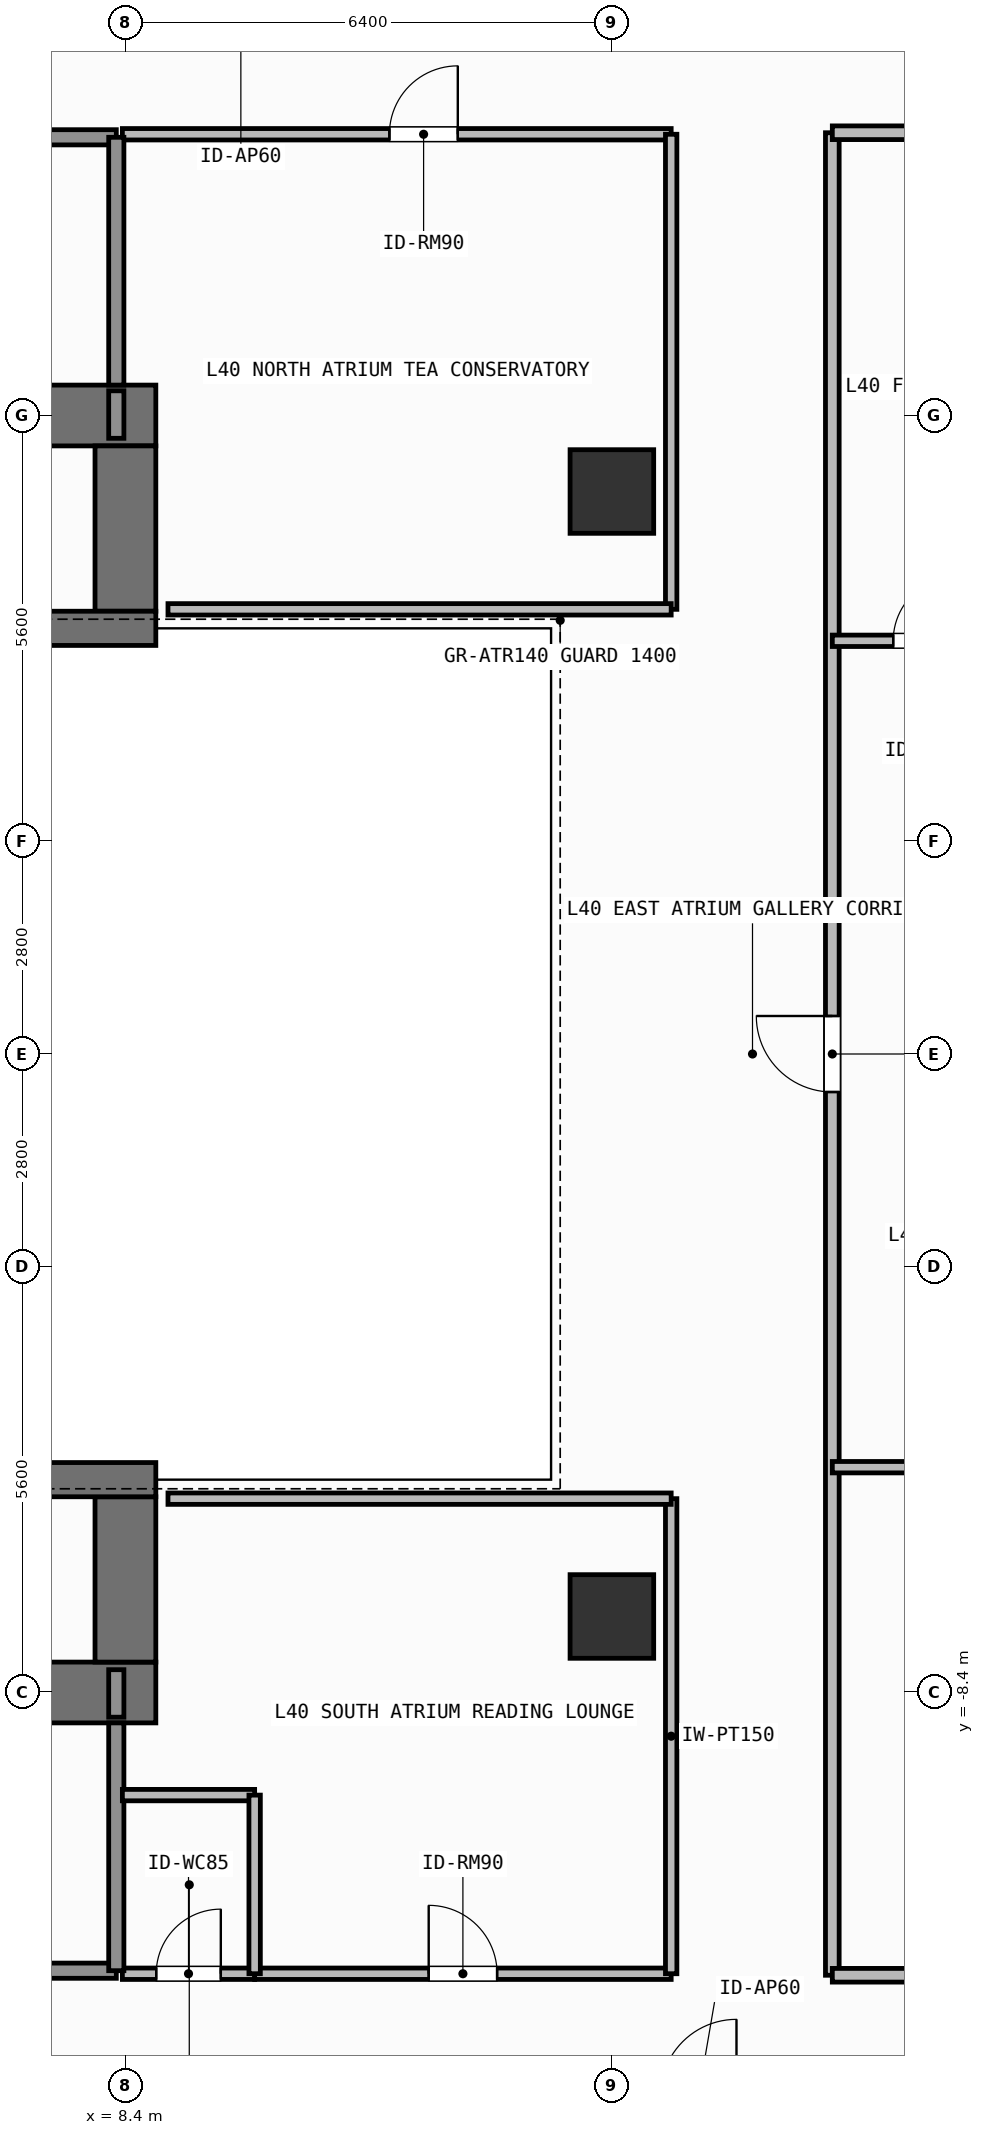
"""IFC4 building model, lengths in metres.
Left out: names, types, materials, properties, quantities, classifications, styles, units other than length and angle.
Written with IfcOpenShell. Run it as: python <this file> out.ifc"""

import sys

from ifc_helpers import new_model, si_unit, direction, frame, frame_2d, origin, origin_2d, place, context, subcontext, project, spatial, rectangle, extrude, element, fill, save


model = new_model("IFC4")
c1 = context("Model", 3, precision=1e-05, world=origin(), true_north=direction((0.0, 1.0)))
c2 = subcontext(c1, "Body", "Model", "MODEL_VIEW")
j1 = project(units=[si_unit("LENGTHUNIT", "METRE"), si_unit("PLANEANGLEUNIT", "RADIAN")], contexts=[c1])
p1 = place(None, origin())
s1 = spatial("IfcSite", under=j1, at=p1, CompositionType="ELEMENT")
p2 = place(p1, origin())
s2 = spatial("IfcBuilding", under=s1, at=p2, CompositionType="ELEMENT")
p3 = place(p2, frame((0.0, 0.0, 164.1)))
s3 = spatial("IfcBuildingStorey", under=s2, at=p3, CompositionType="ELEMENT", Elevation=164.1)
p4 = place(p3, frame((6.12, -8.4, 0.0), z_axis=(0.0, 0.0, 1.0), x_axis=(1.0, 0.0, 0.0)))
e1 = element("IfcWall", 1, at=p4, inside=s3, PredefinedType="SHEAR", context=c2, shape_type="SweptSolid", body=[
    extrude(rectangle(XDim=2.68, YDim=0.8, at=frame_2d((1.34, 0.0))), origin(), (0.0, 0.0, 1.0), 3.9),
])
p5 = place(p3, frame((-7.55, 8.4, 0.0), z_axis=(0.0, 0.0, 1.0), x_axis=(1.0, 0.0, 0.0)))
e2 = element("IfcWall", 2, at=p5, inside=s3, PredefinedType="SHEAR", context=c2, shape_type="SweptSolid", body=[
    extrude(rectangle(XDim=16.35, YDim=0.8, at=frame_2d((8.175, 0.0))), origin(), (0.0, 0.0, 1.0), 3.9),
])
for number, where, z_axis, x_axis in (
    (3, (8.4, -8.0, 0.0), (0.0, 0.0, 1.0), (0.0, 1.0, 0.0)),
    (4, (8.4, 5.825, 0.0), (0.0, 0.0, 1.0), (0.0, 1.0, 0.0)),
):
    element("IfcWall", number, at=place(p3, frame(where, z_axis=z_axis, x_axis=x_axis)), inside=s3, PredefinedType="SHEAR", context=c2, shape_type="SweptSolid", body=[
        extrude(rectangle(XDim=2.175, YDim=0.8, at=frame_2d((1.087, 0.0))), origin(), (0.0, 0.0, 1.0), 3.9),
    ])
for number, where, z_axis, x_axis in (
    (5, (3.045, -5.6, 0.0), (0.0, 0.0, 1.0), (1.0, 0.0, 0.0)),
    (6, (3.045, 5.6, 0.0), (0.0, 0.0, 1.0), (1.0, 0.0, 0.0)),
):
    element("IfcWall", number, at=place(p3, frame(where, z_axis=z_axis, x_axis=x_axis)), inside=s3, PredefinedType="SHEAR", context=c2, shape_type="SweptSolid", body=[
        extrude(rectangle(XDim=5.755, YDim=0.45, at=frame_2d((2.877, 0.0))), origin(), (0.0, 0.0, 1.0), 3.9),
    ])
for number, where, z_axis, x_axis in (
    (7, (14.8, -7.4, 0.0), (0.0, 0.0, 1.0), (1.0, 0.0, 0.0)),
    (8, (14.8, 7.4, 0.0), (0.0, 0.0, 1.0), (1.0, 0.0, 0.0)),
):
    element("IfcColumn", number, at=place(p3, frame(where, z_axis=z_axis, x_axis=x_axis)), inside=s3, PredefinedType="COLUMN", context=c2, shape_type="SweptSolid", body=[
        extrude(rectangle(XDim=1.1, YDim=1.1, at=origin_2d()), origin(), (0.0, 0.0, 1.0), 3.9),
    ])
p6 = place(p3, frame((4.58, -12.06, 0.0), z_axis=(0.0, 0.0, 1.0), x_axis=(1.0, 0.0, 0.0)))
e9 = element("IfcWall", 9, at=p6, inside=s3, PredefinedType="SOLIDWALL", context=c2, shape_type="SweptSolid", body=[
    extrude(rectangle(XDim=3.7, YDim=0.2, at=frame_2d((1.85, 0.0))), origin(), (0.0, 0.0, 1.0), 3.62),
])
p7 = place(p6, frame((1.212, 0.0, 0.0)))
e10 = element("IfcOpeningElement", 10, at=p7, cuts=e9, PredefinedType="OPENING", context=c2, shape_type="SweptSolid", body=[
    extrude(rectangle(XDim=1.1, YDim=2.15, at=frame_2d((0.55, 1.075))), frame((0.0, 0.11, 0.0), z_axis=(0.0, -1.0, 0.0), x_axis=(1.0, 0.0, 0.0)), (0.0, 0.0, 1.0), 0.22),
])
p8 = place(p3, frame((4.58, 12.06, 0.0), z_axis=(0.0, 0.0, 1.0), x_axis=(1.0, 0.0, 0.0)))
e11 = element("IfcWall", 11, at=p8, inside=s3, PredefinedType="SOLIDWALL", context=c2, shape_type="SweptSolid", body=[
    extrude(rectangle(XDim=3.7, YDim=0.2, at=frame_2d((1.85, 0.0))), origin(), (0.0, 0.0, 1.0), 3.62),
])
p9 = place(p8, frame((1.212, 0.0, 0.0)))
e12 = element("IfcOpeningElement", 12, at=p9, cuts=e11, PredefinedType="OPENING", context=c2, shape_type="SweptSolid", body=[
    extrude(rectangle(XDim=1.1, YDim=2.15, at=frame_2d((0.55, 1.075))), frame((0.0, 0.11, 0.0), z_axis=(0.0, -1.0, 0.0), x_axis=(1.0, 0.0, 0.0)), (0.0, 0.0, 1.0), 0.22),
])
p10 = place(p3, frame((8.36, -12.1, 0.0), z_axis=(0.0, 0.0, 1.0), x_axis=(1.0, 0.0, 0.0)))
e13 = element("IfcWall", 13, at=p10, inside=s3, PredefinedType="PARTITIONING", context=c2, shape_type="SweptSolid", body=[
    extrude(rectangle(XDim=1.74, YDim=0.15, at=frame_2d((0.87, 0.0))), origin(), (0.0, 0.0, 1.0), 3.62),
])
p11 = place(p10, frame((0.445, 0.0, 0.0)))
e14 = element("IfcOpeningElement", 14, at=p11, cuts=e13, PredefinedType="OPENING", context=c2, shape_type="SweptSolid", body=[
    extrude(rectangle(XDim=0.85, YDim=2.1, at=frame_2d((0.425, 1.05))), frame((0.0, 0.085, 0.0), z_axis=(0.0, -1.0, 0.0), x_axis=(1.0, 0.0, 0.0)), (0.0, 0.0, 1.0), 0.17),
])
p12 = place(p3, frame((10.1, -12.1, 0.0), z_axis=(0.0, 0.0, 1.0), x_axis=(1.0, 0.0, 0.0)))
e15 = element("IfcWall", 15, at=p12, inside=s3, PredefinedType="PARTITIONING", context=c2, shape_type="SweptSolid", body=[
    extrude(rectangle(XDim=5.48, YDim=0.15, at=frame_2d((2.74, 0.0))), origin(), (0.0, 0.0, 1.0), 3.62),
])
p13 = place(p12, frame((2.29, 0.0, 0.0)))
e16 = element("IfcOpeningElement", 16, at=p13, cuts=e15, PredefinedType="OPENING", context=c2, shape_type="SweptSolid", body=[
    extrude(rectangle(XDim=0.9, YDim=2.1, at=frame_2d((0.45, 1.05))), frame((0.0, 0.085, 0.0), z_axis=(0.0, -1.0, 0.0), x_axis=(1.0, 0.0, 0.0)), (0.0, 0.0, 1.0), 0.17),
])
p14 = place(p3, frame((8.36, 12.1, 0.0), z_axis=(0.0, 0.0, 1.0), x_axis=(1.0, 0.0, 0.0)))
e17 = element("IfcWall", 17, at=p14, inside=s3, PredefinedType="PARTITIONING", context=c2, shape_type="SweptSolid", body=[
    extrude(rectangle(XDim=7.22, YDim=0.15, at=frame_2d((3.61, 0.0))), origin(), (0.0, 0.0, 1.0), 3.62),
])
p15 = place(p14, frame((3.513, 0.0, 0.0)))
e18 = element("IfcOpeningElement", 18, at=p15, cuts=e17, PredefinedType="OPENING", context=c2, shape_type="SweptSolid", body=[
    extrude(rectangle(XDim=0.9, YDim=2.1, at=frame_2d((0.45, 1.05))), frame((0.0, 0.085, 0.0), z_axis=(0.0, -1.0, 0.0), x_axis=(1.0, 0.0, 0.0)), (0.0, 0.0, 1.0), 0.17),
])
p16 = place(p3, frame((17.7, -12.12, 0.0), z_axis=(0.0, 0.0, 1.0), x_axis=(0.0, 1.0, 0.0)))
e19 = element("IfcWall", 19, at=p16, inside=s3, PredefinedType="PARTITIONING", context=c2, shape_type="SweptSolid", body=[
    extrude(rectangle(XDim=24.24, YDim=0.18, at=frame_2d((12.12, 0.0))), origin(), (0.0, 0.0, 1.0), 3.62),
])
p17 = place(p16, frame((11.62, 0.0, 0.0)))
e20 = element("IfcOpeningElement", 20, at=p17, cuts=e19, PredefinedType="OPENING", context=c2, shape_type="SweptSolid", body=[
    extrude(rectangle(XDim=1.0, YDim=2.2, at=frame_2d((0.5, 1.1))), frame((0.0, 0.1, 0.0), z_axis=(0.0, -1.0, 0.0), x_axis=(1.0, 0.0, 0.0)), (0.0, 0.0, 1.0), 0.2),
])
p18 = place(p3, frame((17.7, 5.436, 0.0), z_axis=(0.0, 0.0, 1.0), x_axis=(1.0, 0.0, 0.0)))
e21 = element("IfcWall", 21, at=p18, inside=s3, PredefinedType="PARTITIONING", context=c2, shape_type="SweptSolid", body=[
    extrude(rectangle(XDim=2.292, YDim=0.15, at=frame_2d((1.146, 0.0))), origin(), (0.0, 0.0, 1.0), 3.62),
])
p19 = place(p18, frame((0.801, 0.0, 0.0)))
e22 = element("IfcOpeningElement", 22, at=p19, cuts=e21, PredefinedType="OPENING", context=c2, shape_type="SweptSolid", body=[
    extrude(rectangle(XDim=0.85, YDim=2.1, at=frame_2d((0.425, 1.05))), frame((0.0, 0.085, 0.0), z_axis=(0.0, -1.0, 0.0), x_axis=(1.0, 0.0, 0.0)), (0.0, 0.0, 1.0), 0.17),
])
p20 = place(p3, frame((17.7, -5.436, 0.0), z_axis=(0.0, 0.0, 1.0), x_axis=(1.0, 0.0, 0.0)))
e23 = element("IfcWall", 23, at=p20, inside=s3, PredefinedType="PARTITIONING", context=c2, shape_type="SweptSolid", body=[
    extrude(rectangle(XDim=5.59, YDim=0.15, at=frame_2d((2.795, 0.0))), origin(), (0.0, 0.0, 1.0), 3.62),
])
p21 = place(p20, frame((4.05, 0.0, 0.0)))
e24 = element("IfcOpeningElement", 24, at=p21, cuts=e23, PredefinedType="OPENING", context=c2, shape_type="SweptSolid", body=[
    extrude(rectangle(XDim=0.85, YDim=2.1, at=frame_2d((0.425, 1.05))), frame((0.0, 0.085, 0.0), z_axis=(0.0, -1.0, 0.0), x_axis=(1.0, 0.0, 0.0)), (0.0, 0.0, 1.0), 0.17),
])
for number, where, z_axis, x_axis in (
    (25, (8.28, -12.06, 0.0), (0.0, 0.0, 1.0), (0.0, 1.0, 0.0)),
    (26, (8.28, 8.8, 0.0), (0.0, 0.0, 1.0), (0.0, 1.0, 0.0)),
):
    element("IfcWall", number, at=place(p3, frame(where, z_axis=z_axis, x_axis=x_axis)), inside=s3, PredefinedType="SOLIDWALL", context=c2, shape_type="SweptSolid", body=[
        extrude(rectangle(XDim=3.26, YDim=0.2, at=frame_2d((1.63, 0.0))), origin(), (0.0, 0.0, 1.0), 3.62),
    ])
p22 = place(p3, frame((8.28, -8.725, 0.0), z_axis=(0.0, 0.0, 1.0), x_axis=(0.0, 1.0, 0.0)))
e27 = element("IfcWall", 27, at=p22, inside=s3, PredefinedType="SOLIDWALL", context=c2, shape_type="SweptSolid", body=[
    extrude(rectangle(XDim=0.625, YDim=0.2, at=frame_2d((0.312, 0.0))), origin(), (0.0, 0.0, 1.0), 3.62),
])
p23 = place(p3, frame((8.36, -9.75, 0.0), z_axis=(0.0, 0.0, 1.0), x_axis=(1.0, 0.0, 0.0)))
e28 = element("IfcWall", 28, at=p23, inside=s3, PredefinedType="PARTITIONING", context=c2, shape_type="SweptSolid", body=[
    extrude(rectangle(XDim=1.74, YDim=0.15, at=frame_2d((0.87, 0.0))), origin(), (0.0, 0.0, 1.0), 3.62),
])
p24 = place(p3, frame((10.1, -12.1, 0.0), z_axis=(0.0, 0.0, 1.0), x_axis=(0.0, 1.0, 0.0)))
e29 = element("IfcWall", 29, at=p24, inside=s3, PredefinedType="PARTITIONING", context=c2, shape_type="SweptSolid", body=[
    extrude(rectangle(XDim=2.35, YDim=0.15, at=frame_2d((1.175, 0.0))), origin(), (0.0, 0.0, 1.0), 3.62),
])
p25 = place(p3, frame((15.58, -12.1, 0.0), z_axis=(0.0, 0.0, 1.0), x_axis=(0.0, 1.0, 0.0)))
e30 = element("IfcWall", 30, at=p25, inside=s3, PredefinedType="PARTITIONING", context=c2, shape_type="SweptSolid", body=[
    extrude(rectangle(XDim=6.25, YDim=0.15, at=frame_2d((3.125, 0.0))), origin(), (0.0, 0.0, 1.0), 3.62),
])
p26 = place(p3, frame((8.96, -5.85, 0.0), z_axis=(0.0, 0.0, 1.0), x_axis=(1.0, 0.0, 0.0)))
e31 = element("IfcWall", 31, at=p26, inside=s3, PredefinedType="PARTITIONING", context=c2, shape_type="SweptSolid", body=[
    extrude(rectangle(XDim=6.62, YDim=0.15, at=frame_2d((3.31, 0.0))), origin(), (0.0, 0.0, 1.0), 3.62),
])
p27 = place(p3, frame((8.28, 8.1, 0.0), z_axis=(0.0, 0.0, 1.0), x_axis=(0.0, 1.0, 0.0)))
e32 = element("IfcWall", 32, at=p27, inside=s3, PredefinedType="SOLIDWALL", context=c2, shape_type="SweptSolid", body=[
    extrude(rectangle(XDim=0.625, YDim=0.2, at=frame_2d((0.312, 0.0))), origin(), (0.0, 0.0, 1.0), 3.62),
])
p28 = place(p3, frame((15.58, 5.85, 0.0), z_axis=(0.0, 0.0, 1.0), x_axis=(0.0, 1.0, 0.0)))
e33 = element("IfcWall", 33, at=p28, inside=s3, PredefinedType="PARTITIONING", context=c2, shape_type="SweptSolid", body=[
    extrude(rectangle(XDim=6.25, YDim=0.15, at=frame_2d((3.125, 0.0))), origin(), (0.0, 0.0, 1.0), 3.62),
])
p29 = place(p3, frame((8.96, 5.85, 0.0), z_axis=(0.0, 0.0, 1.0), x_axis=(1.0, 0.0, 0.0)))
e34 = element("IfcWall", 34, at=p29, inside=s3, PredefinedType="PARTITIONING", context=c2, shape_type="SweptSolid", body=[
    extrude(rectangle(XDim=6.62, YDim=0.15, at=frame_2d((3.31, 0.0))), origin(), (0.0, 0.0, 1.0), 3.62),
])
for number, where, z_axis, x_axis in (
    (35, (17.7, -12.12, 0.0), (0.0, 0.0, 1.0), (1.0, 0.0, 0.0)),
    (36, (17.7, 12.12, 0.0), (0.0, 0.0, 1.0), (1.0, 0.0, 0.0)),
):
    element("IfcWall", number, at=place(p3, frame(where, z_axis=z_axis, x_axis=x_axis)), inside=s3, PredefinedType="PARTITIONING", context=c2, shape_type="SweptSolid", body=[
        extrude(rectangle(XDim=9.83, YDim=0.18, at=frame_2d((4.915, 0.0))), origin(), (0.0, 0.0, 1.0), 3.62),
    ])
p30 = place(p11, origin())
e37 = element("IfcDoor", 37, at=p30, inside=s3, OperationType="SINGLE_SWING_RIGHT", PredefinedType="DOOR", context=c2, shape_type="SweptSolid", body=[
    extrude(rectangle(XDim=0.85, YDim=2.1, at=frame_2d((0.425, 1.05))), frame((0.0, 0.025, 0.0), z_axis=(0.0, -1.0, 0.0), x_axis=(1.0, 0.0, 0.0)), (0.0, 0.0, 1.0), 0.05),
])
fill(e14, e37)
p31 = place(p13, origin())
e38 = element("IfcDoor", 38, at=p31, inside=s3, OperationType="SINGLE_SWING_LEFT", PredefinedType="DOOR", context=c2, shape_type="SweptSolid", body=[
    extrude(rectangle(XDim=0.9, YDim=2.1, at=frame_2d((0.45, 1.05))), frame((0.0, 0.025, 0.0), z_axis=(0.0, -1.0, 0.0), x_axis=(1.0, 0.0, 0.0)), (0.0, 0.0, 1.0), 0.05),
])
fill(e16, e38)
p32 = place(p15, origin())
e39 = element("IfcDoor", 39, at=p32, inside=s3, OperationType="SINGLE_SWING_RIGHT", PredefinedType="DOOR", context=c2, shape_type="SweptSolid", body=[
    extrude(rectangle(XDim=0.9, YDim=2.1, at=frame_2d((0.45, 1.05))), frame((0.0, 0.025, 0.0), z_axis=(0.0, -1.0, 0.0), x_axis=(1.0, 0.0, 0.0)), (0.0, 0.0, 1.0), 0.05),
])
fill(e18, e39)
p33 = place(p17, origin())
e40 = element("IfcDoor", 40, at=p33, inside=s3, OperationType="SINGLE_SWING_RIGHT", PredefinedType="DOOR", context=c2, shape_type="SweptSolid", body=[
    extrude(rectangle(XDim=1.0, YDim=2.2, at=frame_2d((0.5, 1.1))), frame((0.0, 0.025, 0.0), z_axis=(0.0, -1.0, 0.0), x_axis=(1.0, 0.0, 0.0)), (0.0, 0.0, 1.0), 0.05),
])
fill(e20, e40)
p34 = place(p19, origin())
e41 = element("IfcDoor", 41, at=p34, inside=s3, OperationType="SINGLE_SWING_RIGHT", PredefinedType="DOOR", context=c2, shape_type="SweptSolid", body=[
    extrude(rectangle(XDim=0.85, YDim=2.1, at=frame_2d((0.425, 1.05))), frame((0.0, 0.025, 0.0), z_axis=(0.0, -1.0, 0.0), x_axis=(1.0, 0.0, 0.0)), (0.0, 0.0, 1.0), 0.05),
])
fill(e22, e41)
save(model, sys.argv[1])
